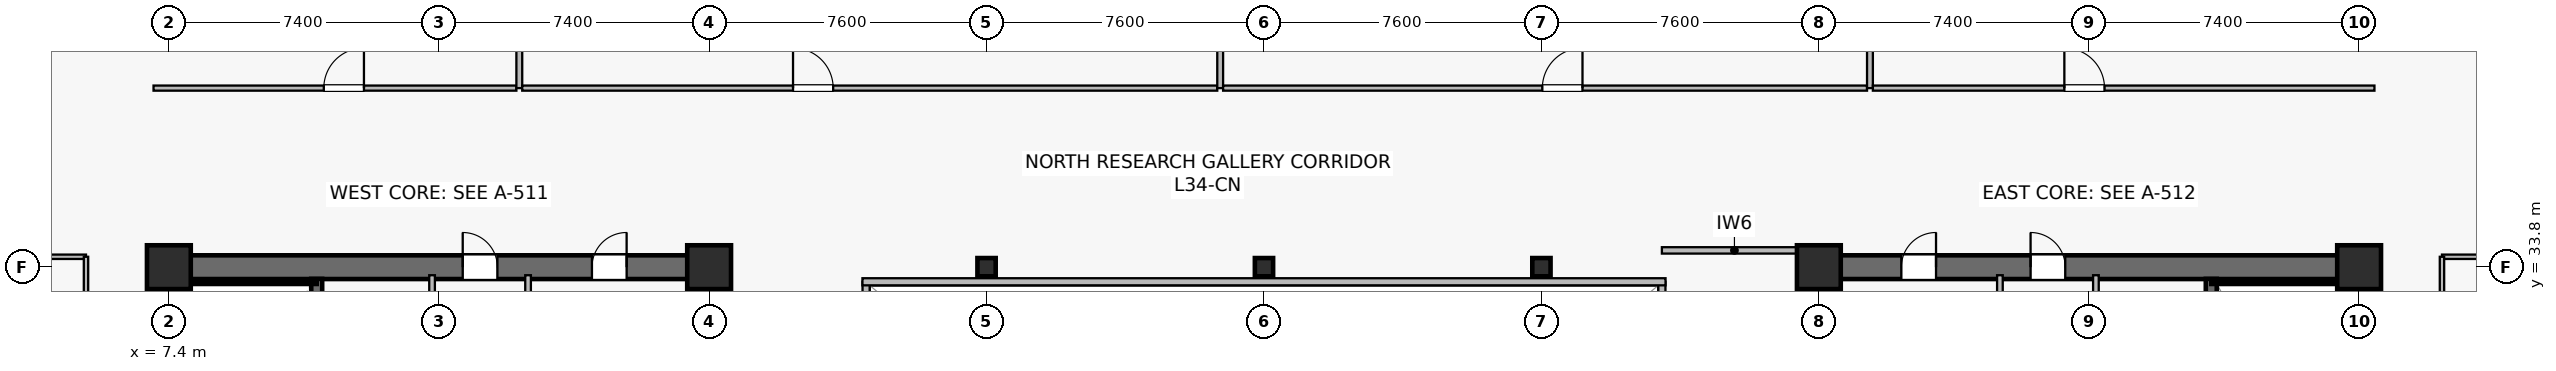
"""IFC4 building model, lengths in metres.
Left out: names, types, materials, properties, quantities, classifications, styles, units other than length and angle.
Written with IfcOpenShell. Run it as: python <this file> out.ifc"""

import sys

from ifc_helpers import new_model, si_unit, direction, frame, frame_2d, origin, origin_2d, place, context, subcontext, project, spatial, rectangle, hollow_rectangle, extrude, source, transform, mapped, element, fill, save


model = new_model("IFC4")
c1 = context("Model", 3, precision=1e-05, world=origin(), true_north=direction((0.0, 1.0)))
c2 = subcontext(c1, "Body", "Model", "MODEL_VIEW")
j1 = project(units=[si_unit("LENGTHUNIT", "METRE"), si_unit("PLANEANGLEUNIT", "RADIAN")], contexts=[c1])
p1 = place(None, origin())
s1 = spatial("IfcSite", under=j1, at=p1, CompositionType="ELEMENT")
p2 = place(p1, origin())
s2 = spatial("IfcBuilding", under=s1, at=p2, CompositionType="ELEMENT")
p3 = place(p2, frame((0.0, 0.0, 142.0)))
s3 = spatial("IfcBuildingStorey", under=s2, at=p3, CompositionType="ELEMENT", Elevation=142.0)
p4 = place(p3, frame((7.075, 33.8, 0.0), z_axis=(0.0, 0.0, 1.0), x_axis=(1.0, 0.0, 0.0)))
e1 = element("IfcWall", 1, at=p4, inside=s3, PredefinedType="SHEAR", context=c2, shape_type="SweptSolid", body=[
    extrude(rectangle(XDim=15.45, YDim=0.65, at=frame_2d((7.725, 0.0))), origin(), (0.0, 0.0, 1.0), 3.79),
])
p5 = place(p4, frame((8.375, 0.0, 0.0)))
e2 = element("IfcOpeningElement", 2, at=p5, cuts=e1, PredefinedType="OPENING", context=c2, shape_type="SweptSolid", body=[
    extrude(rectangle(XDim=0.95, YDim=2.15, at=frame_2d((0.475, 1.075))), frame((0.0, 0.335, 0.0), z_axis=(0.0, -1.0, 0.0), x_axis=(1.0, 0.0, 0.0)), (0.0, 0.0, 1.0), 0.67),
])
p6 = place(p4, frame((11.915, 0.0, 0.0)))
e3 = element("IfcOpeningElement", 3, at=p6, cuts=e1, PredefinedType="OPENING", context=c2, shape_type="SweptSolid", body=[
    extrude(rectangle(XDim=0.95, YDim=2.15, at=frame_2d((0.475, 1.075))), frame((0.0, 0.335, 0.0), z_axis=(0.0, -1.0, 0.0), x_axis=(1.0, 0.0, 0.0)), (0.0, 0.0, 1.0), 0.67),
])
p7 = place(p3, frame((7.4, 15.125, 0.0), z_axis=(0.0, 0.0, 1.0), x_axis=(0.0, 1.0, 0.0)))
e4 = element("IfcWall", 4, at=p7, inside=s3, PredefinedType="SHEAR", context=c2, shape_type="SweptSolid", body=[
    extrude(rectangle(XDim=18.35, YDim=0.65, at=frame_2d((9.175, 0.0))), origin(), (0.0, 0.0, 1.0), 3.79),
])
p8 = place(p3, frame((22.2, 15.125, 0.0), z_axis=(0.0, 0.0, 1.0), x_axis=(0.0, 1.0, 0.0)))
e5 = element("IfcWall", 5, at=p8, inside=s3, PredefinedType="SHEAR", context=c2, shape_type="SweptSolid", body=[
    extrude(rectangle(XDim=18.35, YDim=0.65, at=frame_2d((9.175, 0.0))), origin(), (0.0, 0.0, 1.0), 3.79),
])
p9 = place(p8, frame((3.425, 0.0, 0.0)))
e6 = element("IfcOpeningElement", 6, at=p9, cuts=e5, PredefinedType="OPENING", context=c2, shape_type="SweptSolid", body=[
    extrude(rectangle(XDim=1.42, YDim=2.2, at=frame_2d((0.71, 1.1))), frame((0.0, 0.335, 0.0), z_axis=(0.0, -1.0, 0.0), x_axis=(1.0, 0.0, 0.0)), (0.0, 0.0, 1.0), 0.67),
])
p10 = place(p3, frame((11.45, 24.85, 0.0), z_axis=(0.0, 0.0, 1.0), x_axis=(0.0, 1.0, 0.0)))
e7 = element("IfcWall", 7, at=p10, inside=s3, PredefinedType="SHEAR", context=c2, shape_type="SweptSolid", body=[
    extrude(rectangle(XDim=8.63, YDim=0.3, at=frame_2d((4.315, 0.0))), origin(), (0.0, 0.0, 1.0), 3.79),
])
p11 = place(p10, frame((0.42, 0.0, 0.0)))
e8 = element("IfcOpeningElement", 8, at=p11, cuts=e7, PredefinedType="OPENING", context=c2, shape_type="SweptSolid", body=[
    extrude(rectangle(XDim=1.1, YDim=2.15, at=frame_2d((0.55, 1.075))), frame((0.0, 0.16, 0.0), z_axis=(0.0, -1.0, 0.0), x_axis=(1.0, 0.0, 0.0)), (0.0, 0.0, 1.0), 0.32),
])
p12 = place(p3, frame((7.73, 33.4, 0.0), z_axis=(0.0, 0.0, 1.0), x_axis=(1.0, 0.0, 0.0)))
e9 = element("IfcWall", 9, at=p12, inside=s3, PredefinedType="SOLIDWALL", context=c2, shape_type="SweptSolid", body=[
    extrude(rectangle(XDim=3.72, YDim=0.12, at=frame_2d((1.86, 0.0))), origin(), (0.0, 0.0, 1.0), 3.79),
])
p13 = place(p3, frame((7.73, 25.0, 0.0), z_axis=(0.0, 0.0, 1.0), x_axis=(0.0, 1.0, 0.0)))
e10 = element("IfcWall", 10, at=p13, inside=s3, PredefinedType="SOLIDWALL", context=c2, shape_type="SweptSolid", body=[
    extrude(rectangle(XDim=8.32, YDim=0.12, at=frame_2d((4.16, 0.0))), origin(), (0.0, 0.0, 1.0), 3.79),
])
p14 = place(p3, frame((52.275, 33.8, 0.0), z_axis=(0.0, 0.0, 1.0), x_axis=(1.0, 0.0, 0.0)))
e11 = element("IfcWall", 11, at=p14, inside=s3, PredefinedType="SHEAR", context=c2, shape_type="SweptSolid", body=[
    extrude(rectangle(XDim=15.45, YDim=0.65, at=frame_2d((7.725, 0.0))), origin(), (0.0, 0.0, 1.0), 3.79),
])
p15 = place(p14, frame((6.125, 0.0, 0.0)))
e12 = element("IfcOpeningElement", 12, at=p15, cuts=e11, PredefinedType="OPENING", context=c2, shape_type="SweptSolid", body=[
    extrude(rectangle(XDim=0.95, YDim=2.15, at=frame_2d((0.475, 1.075))), frame((0.0, 0.335, 0.0), z_axis=(0.0, -1.0, 0.0), x_axis=(1.0, 0.0, 0.0)), (0.0, 0.0, 1.0), 0.67),
])
p16 = place(p14, frame((2.585, 0.0, 0.0)))
e13 = element("IfcOpeningElement", 13, at=p16, cuts=e11, PredefinedType="OPENING", context=c2, shape_type="SweptSolid", body=[
    extrude(rectangle(XDim=0.95, YDim=2.15, at=frame_2d((0.475, 1.075))), frame((0.0, 0.335, 0.0), z_axis=(0.0, -1.0, 0.0), x_axis=(1.0, 0.0, 0.0)), (0.0, 0.0, 1.0), 0.67),
])
p17 = place(p3, frame((52.6, 15.125, 0.0), z_axis=(0.0, 0.0, 1.0), x_axis=(0.0, 1.0, 0.0)))
e14 = element("IfcWall", 14, at=p17, inside=s3, PredefinedType="SHEAR", context=c2, shape_type="SweptSolid", body=[
    extrude(rectangle(XDim=18.35, YDim=0.65, at=frame_2d((9.175, 0.0))), origin(), (0.0, 0.0, 1.0), 3.79),
])
p18 = place(p17, frame((3.425, 0.0, 0.0)))
e15 = element("IfcOpeningElement", 15, at=p18, cuts=e14, PredefinedType="OPENING", context=c2, shape_type="SweptSolid", body=[
    extrude(rectangle(XDim=1.42, YDim=2.2, at=frame_2d((0.71, 1.1))), frame((0.0, 0.335, 0.0), z_axis=(0.0, -1.0, 0.0), x_axis=(1.0, 0.0, 0.0)), (0.0, 0.0, 1.0), 0.67),
])
p19 = place(p3, frame((67.4, 15.125, 0.0), z_axis=(0.0, 0.0, 1.0), x_axis=(0.0, 1.0, 0.0)))
e16 = element("IfcWall", 16, at=p19, inside=s3, PredefinedType="SHEAR", context=c2, shape_type="SweptSolid", body=[
    extrude(rectangle(XDim=18.35, YDim=0.65, at=frame_2d((9.175, 0.0))), origin(), (0.0, 0.0, 1.0), 3.79),
])
p20 = place(p3, frame((63.35, 24.85, 0.0), z_axis=(0.0, 0.0, 1.0), x_axis=(0.0, 1.0, 0.0)))
e17 = element("IfcWall", 17, at=p20, inside=s3, PredefinedType="SHEAR", context=c2, shape_type="SweptSolid", body=[
    extrude(rectangle(XDim=8.63, YDim=0.3, at=frame_2d((4.315, 0.0))), origin(), (0.0, 0.0, 1.0), 3.79),
])
p21 = place(p20, frame((0.42, 0.0, 0.0)))
e18 = element("IfcOpeningElement", 18, at=p21, cuts=e17, PredefinedType="OPENING", context=c2, shape_type="SweptSolid", body=[
    extrude(rectangle(XDim=1.1, YDim=2.15, at=frame_2d((0.55, 1.075))), frame((0.0, 0.16, 0.0), z_axis=(0.0, -1.0, 0.0), x_axis=(1.0, 0.0, 0.0)), (0.0, 0.0, 1.0), 0.32),
])
p22 = place(p3, frame((63.35, 33.4, 0.0), z_axis=(0.0, 0.0, 1.0), x_axis=(1.0, 0.0, 0.0)))
e19 = element("IfcWall", 19, at=p22, inside=s3, PredefinedType="SOLIDWALL", context=c2, shape_type="SweptSolid", body=[
    extrude(rectangle(XDim=3.72, YDim=0.12, at=frame_2d((1.86, 0.0))), origin(), (0.0, 0.0, 1.0), 3.79),
])
p23 = place(p3, frame((67.07, 25.0, 0.0), z_axis=(0.0, 0.0, 1.0), x_axis=(0.0, 1.0, 0.0)))
e20 = element("IfcWall", 20, at=p23, inside=s3, PredefinedType="SOLIDWALL", context=c2, shape_type="SweptSolid", body=[
    extrude(rectangle(XDim=8.32, YDim=0.12, at=frame_2d((4.16, 0.0))), origin(), (0.0, 0.0, 1.0), 3.79),
])
m1 = source(origin(), c2, "Body", "SweptSolid", [
    extrude(rectangle(XDim=1.2, YDim=1.2, at=origin_2d()), origin(), (0.0, 0.0, 1.0), 4.1),
])
for number, where, z_axis, x_axis in (
    (21, (7.4, 33.8, 0.0), (0.0, 0.0, 1.0), (1.0, 0.0, 0.0)),
    (22, (22.2, 33.8, 0.0), (0.0, 0.0, 1.0), (1.0, 0.0, 0.0)),
    (23, (52.6, 33.8, 0.0), (0.0, 0.0, 1.0), (1.0, 0.0, 0.0)),
    (24, (67.4, 33.8, 0.0), (0.0, 0.0, 1.0), (1.0, 0.0, 0.0)),
):
    element("IfcColumn", number, at=place(p3, frame(where, z_axis=z_axis, x_axis=x_axis)), inside=s3, PredefinedType="COLUMN", context=c2, shape_type="MappedRepresentation", body=[
        mapped(m1, transform((0.0, 0.0, 0.0), scale=1.0)),
    ])
m2 = source(origin(), c2, "Body", "SweptSolid", [
    extrude(hollow_rectangle(XDim=0.5, YDim=0.5, WallThickness=0.022, at=origin_2d()), origin(), (0.0, 0.0, 1.0), 4.1),
])
for number, where, z_axis, x_axis in (
    (25, (29.8, 33.8, 0.0), (0.0, 0.0, 1.0), (1.0, 0.0, 0.0)),
    (26, (37.4, 33.8, 0.0), (0.0, 0.0, 1.0), (1.0, 0.0, 0.0)),
    (27, (45.0, 33.8, 0.0), (0.0, 0.0, 1.0), (1.0, 0.0, 0.0)),
):
    element("IfcColumn", number, at=place(p3, frame(where, z_axis=z_axis, x_axis=x_axis)), inside=s3, PredefinedType="COLUMN", context=c2, shape_type="MappedRepresentation", body=[
        mapped(m2, transform((0.0, 0.0, 0.0), scale=1.0)),
    ])
p24 = place(p3, frame((14.61, 29.65, 0.0), z_axis=(0.0, 0.0, 1.0), x_axis=(0.0, 1.0, 0.0)))
e28 = element("IfcWall", 28, at=p24, inside=s3, PredefinedType="PLUMBINGWALL", context=c2, shape_type="SweptSolid", body=[
    extrude(rectangle(XDim=3.93, YDim=0.155, at=frame_2d((1.965, 0.0))), origin(), (0.0, 0.0, 1.0), 3.125),
])
p25 = place(p3, frame((17.24, 29.65, 0.0), z_axis=(0.0, 0.0, 1.0), x_axis=(0.0, 1.0, 0.0)))
e29 = element("IfcWall", 29, at=p25, inside=s3, PredefinedType="PLUMBINGWALL", context=c2, shape_type="SweptSolid", body=[
    extrude(rectangle(XDim=3.93, YDim=0.155, at=frame_2d((1.965, 0.0))), origin(), (0.0, 0.0, 1.0), 3.79),
])
p26 = place(p3, frame((60.19, 29.65, 0.0), z_axis=(0.0, 0.0, 1.0), x_axis=(0.0, 1.0, 0.0)))
e30 = element("IfcWall", 30, at=p26, inside=s3, PredefinedType="PLUMBINGWALL", context=c2, shape_type="SweptSolid", body=[
    extrude(rectangle(XDim=3.93, YDim=0.155, at=frame_2d((1.965, 0.0))), origin(), (0.0, 0.0, 1.0), 3.125),
])
p27 = place(p3, frame((57.56, 29.65, 0.0), z_axis=(0.0, 0.0, 1.0), x_axis=(0.0, 1.0, 0.0)))
e31 = element("IfcWall", 31, at=p27, inside=s3, PredefinedType="PLUMBINGWALL", context=c2, shape_type="SweptSolid", body=[
    extrude(rectangle(XDim=3.93, YDim=0.155, at=frame_2d((1.965, 0.0))), origin(), (0.0, 0.0, 1.0), 3.79),
])
p28 = place(p3, frame((48.3, 34.26, 0.0), z_axis=(0.0, 0.0, 1.0), x_axis=(1.0, 0.0, 0.0)))
e32 = element("IfcWall", 32, at=p28, inside=s3, PredefinedType="PARTITIONING", context=c2, shape_type="SweptSolid", body=[
    extrude(rectangle(XDim=3.975, YDim=0.175, at=frame_2d((1.987, 0.0))), origin(), (0.0, 0.0, 1.0), 3.475),
])
p29 = place(p3, frame((26.5, 15.2, 0.0), z_axis=(0.0, 0.0, 1.0), x_axis=(0.0, 1.0, 0.0)))
e33 = element("IfcWall", 33, at=p29, inside=s3, PredefinedType="SOLIDWALL", context=c2, shape_type="SweptSolid", body=[
    extrude(rectangle(XDim=18.2, YDim=0.195, at=frame_2d((9.1, 0.0))), origin(), (0.0, 0.0, 1.0), 3.79),
])
p30 = place(p29, frame((1.8, 0.0, 0.9)))
e34 = element("IfcOpeningElement", 34, at=p30, cuts=e33, PredefinedType="OPENING", context=c2, shape_type="SweptSolid", body=[
    extrude(rectangle(XDim=1.5, YDim=1.4, at=frame_2d((0.75, 0.7))), frame((0.0, 0.107, 0.0), z_axis=(0.0, -1.0, 0.0), x_axis=(1.0, 0.0, 0.0)), (0.0, 0.0, 1.0), 0.215),
])
p31 = place(p29, frame((13.2, 0.0, 0.9)))
e35 = element("IfcOpeningElement", 35, at=p31, cuts=e33, PredefinedType="OPENING", context=c2, shape_type="SweptSolid", body=[
    extrude(rectangle(XDim=1.5, YDim=1.4, at=frame_2d((0.75, 0.7))), frame((0.0, 0.107, 0.0), z_axis=(0.0, -1.0, 0.0), x_axis=(1.0, 0.0, 0.0)), (0.0, 0.0, 1.0), 0.215),
])
p32 = place(p3, frame((48.3, 15.2, 0.0), z_axis=(0.0, 0.0, 1.0), x_axis=(0.0, 1.0, 0.0)))
e36 = element("IfcWall", 36, at=p32, inside=s3, PredefinedType="SOLIDWALL", context=c2, shape_type="SweptSolid", body=[
    extrude(rectangle(XDim=18.2, YDim=0.195, at=frame_2d((9.1, 0.0))), origin(), (0.0, 0.0, 1.0), 3.79),
])
p33 = place(p32, frame((1.8, 0.0, 0.9)))
e37 = element("IfcOpeningElement", 37, at=p33, cuts=e36, PredefinedType="OPENING", context=c2, shape_type="SweptSolid", body=[
    extrude(rectangle(XDim=1.5, YDim=1.4, at=frame_2d((0.75, 0.7))), frame((0.0, 0.107, 0.0), z_axis=(0.0, -1.0, 0.0), x_axis=(1.0, 0.0, 0.0)), (0.0, 0.0, 1.0), 0.215),
])
p34 = place(p32, frame((13.2, 0.0, 0.9)))
e38 = element("IfcOpeningElement", 38, at=p34, cuts=e36, PredefinedType="OPENING", context=c2, shape_type="SweptSolid", body=[
    extrude(rectangle(XDim=1.5, YDim=1.4, at=frame_2d((0.75, 0.7))), frame((0.0, 0.107, 0.0), z_axis=(0.0, -1.0, 0.0), x_axis=(1.0, 0.0, 0.0)), (0.0, 0.0, 1.0), 0.215),
])
p35 = place(p3, frame((26.4, 33.4, 0.0), z_axis=(0.0, 0.0, 1.0), x_axis=(1.0, 0.0, 0.0)))
e39 = element("IfcWall", 39, at=p35, inside=s3, PredefinedType="SOLIDWALL", context=c2, shape_type="SweptSolid", body=[
    extrude(rectangle(XDim=22.0, YDim=0.195, at=frame_2d((11.0, 0.0))), origin(), (0.0, 0.0, 1.0), 3.79),
])
p36 = place(p3, frame((6.98, 38.705, 0.0), z_axis=(0.0, 0.0, 1.0), x_axis=(1.0, 0.0, 0.0)))
e40 = element("IfcWall", 40, at=p36, inside=s3, PredefinedType="PARTITIONING", context=c2, shape_type="SweptSolid", body=[
    extrude(rectangle(XDim=9.94, YDim=0.14, at=frame_2d((4.97, 0.0))), origin(), (0.0, 0.0, 1.0), 3.125),
])
p37 = place(p36, frame((4.664, 0.0, 0.0)))
e41 = element("IfcOpeningElement", 41, at=p37, cuts=e40, PredefinedType="OPENING", context=c2, shape_type="SweptSolid", body=[
    extrude(rectangle(XDim=1.1, YDim=2.18, at=frame_2d((0.55, 1.09))), frame((0.0, 0.08, 0.0), z_axis=(0.0, -1.0, 0.0), x_axis=(1.0, 0.0, 0.0)), (0.0, 0.0, 1.0), 0.16),
])
p38 = place(p3, frame((17.0, 38.705, 0.0), z_axis=(0.0, 0.0, 1.0), x_axis=(0.0, 1.0, 0.0)))
e42 = element("IfcWall", 42, at=p38, inside=s3, PredefinedType="PARTITIONING", context=c2, shape_type="SweptSolid", body=[
    extrude(rectangle(XDim=8.485, YDim=0.16, at=frame_2d((4.242, 0.0))), origin(), (0.0, 0.0, 1.0), 3.075),
])
p39 = place(p3, frame((17.08, 38.705, 0.0), z_axis=(0.0, 0.0, 1.0), x_axis=(1.0, 0.0, 0.0)))
e43 = element("IfcWall", 43, at=p39, inside=s3, PredefinedType="PARTITIONING", context=c2, shape_type="SweptSolid", body=[
    extrude(rectangle(XDim=19.04, YDim=0.14, at=frame_2d((9.52, 0.0))), origin(), (0.0, 0.0, 1.0), 3.125),
])
p40 = place(p39, frame((7.418, 0.0, 0.0)))
e44 = element("IfcOpeningElement", 44, at=p40, cuts=e43, PredefinedType="OPENING", context=c2, shape_type="SweptSolid", body=[
    extrude(rectangle(XDim=1.1, YDim=2.18, at=frame_2d((0.55, 1.09))), frame((0.0, 0.08, 0.0), z_axis=(0.0, -1.0, 0.0), x_axis=(1.0, 0.0, 0.0)), (0.0, 0.0, 1.0), 0.16),
])
p41 = place(p3, frame((36.2, 38.705, 0.0), z_axis=(0.0, 0.0, 1.0), x_axis=(0.0, 1.0, 0.0)))
e45 = element("IfcWall", 45, at=p41, inside=s3, PredefinedType="PARTITIONING", context=c2, shape_type="SweptSolid", body=[
    extrude(rectangle(XDim=7.285, YDim=0.16, at=frame_2d((3.643, 0.0))), origin(), (0.0, 0.0, 1.0), 3.075),
])
p42 = place(p3, frame((36.28, 38.705, 0.0), z_axis=(0.0, 0.0, 1.0), x_axis=(1.0, 0.0, 0.0)))
e46 = element("IfcWall", 46, at=p42, inside=s3, PredefinedType="PARTITIONING", context=c2, shape_type="SweptSolid", body=[
    extrude(rectangle(XDim=17.64, YDim=0.14, at=frame_2d((8.82, 0.0))), origin(), (0.0, 0.0, 1.0), 3.125),
])
p43 = place(p42, frame((8.745, 0.0, 0.0)))
e47 = element("IfcOpeningElement", 47, at=p43, cuts=e46, PredefinedType="OPENING", context=c2, shape_type="SweptSolid", body=[
    extrude(rectangle(XDim=1.1, YDim=2.18, at=frame_2d((0.55, 1.09))), frame((0.0, 0.08, 0.0), z_axis=(0.0, -1.0, 0.0), x_axis=(1.0, 0.0, 0.0)), (0.0, 0.0, 1.0), 0.16),
])
p44 = place(p3, frame((54.0, 38.705, 0.0), z_axis=(0.0, 0.0, 1.0), x_axis=(0.0, 1.0, 0.0)))
e48 = element("IfcWall", 48, at=p44, inside=s3, PredefinedType="PARTITIONING", context=c2, shape_type="SweptSolid", body=[
    extrude(rectangle(XDim=8.485, YDim=0.16, at=frame_2d((4.242, 0.0))), origin(), (0.0, 0.0, 1.0), 3.075),
])
p45 = place(p3, frame((54.08, 38.705, 0.0), z_axis=(0.0, 0.0, 1.0), x_axis=(1.0, 0.0, 0.0)))
e49 = element("IfcWall", 49, at=p45, inside=s3, PredefinedType="PARTITIONING", context=c2, shape_type="SweptSolid", body=[
    extrude(rectangle(XDim=13.74, YDim=0.14, at=frame_2d((6.87, 0.0))), origin(), (0.0, 0.0, 1.0), 3.125),
])
p46 = place(p45, frame((5.245, 0.0, 0.0)))
e50 = element("IfcOpeningElement", 50, at=p46, cuts=e49, PredefinedType="OPENING", context=c2, shape_type="SweptSolid", body=[
    extrude(rectangle(XDim=1.1, YDim=2.18, at=frame_2d((0.55, 1.09))), frame((0.0, 0.08, 0.0), z_axis=(0.0, -1.0, 0.0), x_axis=(1.0, 0.0, 0.0)), (0.0, 0.0, 1.0), 0.16),
])
p47 = place(p3, frame((2.11, 34.085, 0.0), z_axis=(0.0, 0.0, 1.0), x_axis=(1.0, 0.0, 0.0)))
e51 = element("IfcWall", 51, at=p47, inside=s3, PredefinedType="PARTITIONING", context=c2, shape_type="SweptSolid", body=[
    extrude(rectangle(XDim=3.02, YDim=0.12, at=frame_2d((1.51, 0.0))), origin(), (0.0, 0.0, 1.0), 3.79),
])
p48 = place(p3, frame((5.13, 24.66, 0.0), z_axis=(0.0, 0.0, 1.0), x_axis=(0.0, 1.0, 0.0)))
e52 = element("IfcWall", 52, at=p48, inside=s3, PredefinedType="PARTITIONING", context=c2, shape_type="SweptSolid", body=[
    extrude(rectangle(XDim=9.425, YDim=0.12, at=frame_2d((4.712, 0.0))), origin(), (0.0, 0.0, 1.0), 3.79),
])
p49 = place(p48, frame((4.262, 0.0, 0.0)))
e53 = element("IfcOpeningElement", 53, at=p49, cuts=e52, PredefinedType="OPENING", context=c2, shape_type="SweptSolid", body=[
    extrude(rectangle(XDim=0.9, YDim=2.1, at=frame_2d((0.45, 1.05))), frame((0.0, 0.07, 0.0), z_axis=(0.0, -1.0, 0.0), x_axis=(1.0, 0.0, 0.0)), (0.0, 0.0, 1.0), 0.14),
])
p50 = place(p3, frame((69.67, 34.085, 0.0), z_axis=(0.0, 0.0, 1.0), x_axis=(1.0, 0.0, 0.0)))
e54 = element("IfcWall", 54, at=p50, inside=s3, PredefinedType="PARTITIONING", context=c2, shape_type="SweptSolid", body=[
    extrude(rectangle(XDim=3.02, YDim=0.12, at=frame_2d((1.51, 0.0))), origin(), (0.0, 0.0, 1.0), 3.79),
])
p51 = place(p3, frame((69.67, 26.66, 0.0), z_axis=(0.0, 0.0, 1.0), x_axis=(0.0, 1.0, 0.0)))
e55 = element("IfcWall", 55, at=p51, inside=s3, PredefinedType="PARTITIONING", context=c2, shape_type="SweptSolid", body=[
    extrude(rectangle(XDim=7.425, YDim=0.12, at=frame_2d((3.712, 0.0))), origin(), (0.0, 0.0, 1.0), 3.79),
])
p52 = place(p51, frame((3.262, 0.0, 0.0)))
e56 = element("IfcOpeningElement", 56, at=p52, cuts=e55, PredefinedType="OPENING", context=c2, shape_type="SweptSolid", body=[
    extrude(rectangle(XDim=0.9, YDim=2.1, at=frame_2d((0.45, 1.05))), frame((0.0, 0.07, 0.0), z_axis=(0.0, -1.0, 0.0), x_axis=(1.0, 0.0, 0.0)), (0.0, 0.0, 1.0), 0.14),
])
m3 = source(origin(), c2, "Body", "SweptSolid", [
    extrude(rectangle(XDim=0.95, YDim=2.15, at=frame_2d((0.475, 1.075))), frame((0.0, 0.025, 0.0), z_axis=(0.0, -1.0, 0.0), x_axis=(1.0, 0.0, 0.0)), (0.0, 0.0, 1.0), 0.05),
])
p53 = place(p5, origin())
e57 = element("IfcDoor", 57, at=p53, inside=s3, OperationType="SINGLE_SWING_LEFT", PredefinedType="DOOR", context=c2, shape_type="MappedRepresentation", body=[
    mapped(m3, transform((0.0, 0.0, 0.0), scale=1.0)),
])
fill(e2, e57)
p54 = place(p6, origin())
e58 = element("IfcDoor", 58, at=p54, inside=s3, OperationType="SINGLE_SWING_RIGHT", PredefinedType="DOOR", context=c2, shape_type="MappedRepresentation", body=[
    mapped(m3, transform((0.0, 0.0, 0.0), scale=1.0)),
])
fill(e3, e58)
p55 = place(p15, origin())
e59 = element("IfcDoor", 59, at=p55, inside=s3, OperationType="SINGLE_SWING_LEFT", PredefinedType="DOOR", context=c2, shape_type="MappedRepresentation", body=[
    mapped(m3, transform((0.0, 0.0, 0.0), scale=1.0)),
])
fill(e12, e59)
p56 = place(p16, origin())
e60 = element("IfcDoor", 60, at=p56, inside=s3, OperationType="SINGLE_SWING_RIGHT", PredefinedType="DOOR", context=c2, shape_type="MappedRepresentation", body=[
    mapped(m3, transform((0.0, 0.0, 0.0), scale=1.0)),
])
fill(e13, e60)
m4 = source(origin(), c2, "Body", "SweptSolid", [
    extrude(rectangle(XDim=1.1, YDim=2.18, at=frame_2d((0.55, 1.09))), frame((0.0, 0.025, 0.0), z_axis=(0.0, -1.0, 0.0), x_axis=(1.0, 0.0, 0.0)), (0.0, 0.0, 1.0), 0.05),
])
p57 = place(p37, origin())
e61 = element("IfcDoor", 61, at=p57, inside=s3, OperationType="SINGLE_SWING_RIGHT", PredefinedType="DOOR", context=c2, shape_type="MappedRepresentation", body=[
    mapped(m4, transform((0.0, 0.0, 0.0), scale=1.0)),
])
fill(e41, e61)
p58 = place(p40, origin())
e62 = element("IfcDoor", 62, at=p58, inside=s3, OperationType="SINGLE_SWING_LEFT", PredefinedType="DOOR", context=c2, shape_type="MappedRepresentation", body=[
    mapped(m4, transform((0.0, 0.0, 0.0), scale=1.0)),
])
fill(e44, e62)
p59 = place(p43, origin())
e63 = element("IfcDoor", 63, at=p59, inside=s3, OperationType="SINGLE_SWING_RIGHT", PredefinedType="DOOR", context=c2, shape_type="MappedRepresentation", body=[
    mapped(m4, transform((0.0, 0.0, 0.0), scale=1.0)),
])
fill(e47, e63)
p60 = place(p46, origin())
e64 = element("IfcDoor", 64, at=p60, inside=s3, OperationType="SINGLE_SWING_LEFT", PredefinedType="DOOR", context=c2, shape_type="MappedRepresentation", body=[
    mapped(m4, transform((0.0, 0.0, 0.0), scale=1.0)),
])
fill(e50, e64)
save(model, sys.argv[1])
